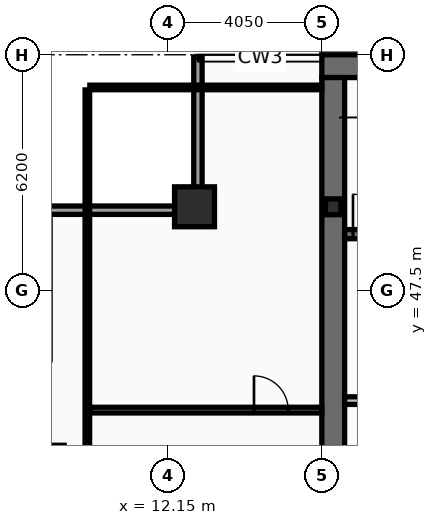
"""IFC4 building model, lengths in metres.
Left out: names, types, materials, properties, quantities, classifications, styles, units other than length and angle.
Written with IfcOpenShell. Run it as: python <this file> out.ifc"""

import sys

from ifc_helpers import new_model, si_unit, direction, frame, frame_2d, origin, origin_2d, place, context, subcontext, project, spatial, rectangle, hollow_rectangle, i_section, extrude, element, fill, save


model = new_model("IFC4")
c1 = context("Model", 3, precision=1e-05, world=origin(), true_north=direction((0.0, 1.0)))
c2 = subcontext(c1, "Body", "Model", "MODEL_VIEW")
j1 = project(units=[si_unit("LENGTHUNIT", "METRE"), si_unit("PLANEANGLEUNIT", "RADIAN")], contexts=[c1])
p1 = place(None, origin())
s1 = spatial("IfcSite", under=j1, at=p1, CompositionType="ELEMENT")
p2 = place(p1, origin())
s2 = spatial("IfcBuilding", under=s1, at=p2, CompositionType="ELEMENT")
p3 = place(p2, frame((0.0, 0.0, 239.0)))
s3 = spatial("IfcBuildingStorey", under=s2, at=p3, CompositionType="ELEMENT", Elevation=239.0)
p4 = place(p3, frame((16.2, 53.4, 0.0), z_axis=(0.0, 0.0, 1.0), x_axis=(1.0, 0.0, 0.0)))
e1 = element("IfcWall", 1, at=p4, inside=s3, PredefinedType="SHEAR", context=c2, shape_type="SweptSolid", body=[
    extrude(rectangle(XDim=40.5, YDim=0.6, at=frame_2d((20.25, 0.0))), origin(), (0.0, 0.0, 1.0), 3.44),
])
p5 = place(p3, frame((16.5, 41.9, 0.0), z_axis=(0.0, 0.0, 1.0), x_axis=(0.0, 1.0, 0.0)))
e2 = element("IfcWall", 2, at=p5, inside=s3, PredefinedType="SHEAR", context=c2, shape_type="SweptSolid", body=[
    extrude(rectangle(XDim=11.2, YDim=0.6, at=frame_2d((5.6, 0.0))), origin(), (0.0, 0.0, 1.0), 3.44),
])
p6 = place(p3, frame((16.8, 48.98, 0.0), z_axis=(0.0, 0.0, 1.0), x_axis=(1.0, 0.0, 0.0)))
e3 = element("IfcWall", 3, at=p6, inside=s3, PredefinedType="SHEAR", context=c2, shape_type="SweptSolid", body=[
    extrude(rectangle(XDim=7.42, YDim=0.24, at=frame_2d((3.71, 0.0))), origin(), (0.0, 0.0, 1.0), 3.44),
])
p7 = place(p6, frame((0.22, 0.0, 0.0)))
e4 = element("IfcOpeningElement", 4, at=p7, cuts=e3, PredefinedType="OPENING", context=c2, shape_type="SweptSolid", body=[
    extrude(rectangle(XDim=1.05, YDim=2.15, at=frame_2d((0.525, 1.075))), frame((0.0, 0.13, 0.0), z_axis=(0.0, -1.0, 0.0), x_axis=(1.0, 0.0, 0.0)), (0.0, 0.0, 1.0), 0.26),
])
p8 = place(p3, frame((12.85, 49.7, 0.0), z_axis=(0.0, 0.0, 1.0), x_axis=(1.0, 0.0, 0.0)))
e5 = element("IfcColumn", 5, at=p8, inside=s3, PredefinedType="COLUMN", context=c2, shape_type="SweptSolid", body=[
    extrude(hollow_rectangle(XDim=1.05, YDim=1.05, WallThickness=0.055, at=origin_2d()), origin(), (0.0, 0.0, 1.0), 3.6),
])
p9 = place(p3, frame((16.5, 49.7, 0.0), z_axis=(0.0, 0.0, 1.0), x_axis=(1.0, 0.0, 0.0)))
e6 = element("IfcColumn", 6, at=p9, inside=s3, PredefinedType="COLUMN", context=c2, shape_type="SweptSolid", body=[
    extrude(i_section(OverallWidth=0.406, OverallDepth=0.416, WebThickness=0.03, FlangeThickness=0.048, at=origin_2d()), origin(), (0.0, 0.0, 1.0), 3.6),
])
p10 = place(p3, frame((8.83, 49.61, 0.0), z_axis=(0.0, 0.0, 1.0), x_axis=(1.0, 0.0, 0.0)))
e7 = element("IfcWall", 7, at=p10, inside=s3, PredefinedType="SOLIDWALL", context=c2, shape_type="SweptSolid", body=[
    extrude(rectangle(XDim=4.22, YDim=0.22, at=frame_2d((2.11, 0.0))), origin(), (0.0, 0.0, 1.0), 2.83),
])
p11 = place(p3, frame((12.94, 49.72, 0.0), z_axis=(0.0, 0.0, 1.0), x_axis=(0.0, 1.0, 0.0)))
e8 = element("IfcWall", 8, at=p11, inside=s3, PredefinedType="SOLIDWALL", context=c2, shape_type="SweptSolid", body=[
    extrude(rectangle(XDim=3.91, YDim=0.22, at=frame_2d((1.955, 0.0))), origin(), (0.0, 0.0, 1.0), 2.83),
])
p12 = place(p3, frame((16.8, 44.6, 0.0), z_axis=(0.0, 0.0, 1.0), x_axis=(1.0, 0.0, 0.0)))
e9 = element("IfcWall", 9, at=p12, inside=s3, PredefinedType="PARTITIONING", context=c2, shape_type="SweptSolid", body=[
    extrude(rectangle(XDim=4.2, YDim=0.2, at=frame_2d((2.1, 0.0))), origin(), (0.0, 0.0, 1.0), 3.44),
])
p13 = place(p12, frame((1.25, 0.0, 0.0)))
e10 = element("IfcOpeningElement", 10, at=p13, cuts=e9, PredefinedType="OPENING", context=c2, shape_type="SweptSolid", body=[
    extrude(rectangle(XDim=1.05, YDim=2.15, at=frame_2d((0.525, 1.075))), frame((0.0, 0.11, 0.0), z_axis=(0.0, -1.0, 0.0), x_axis=(1.0, 0.0, 0.0)), (0.0, 0.0, 1.0), 0.22),
])
p14 = place(p3, frame((10.095, 44.35, 0.0), z_axis=(0.0, 0.0, 1.0), x_axis=(1.0, 0.0, 0.0)))
e11 = element("IfcWall", 11, at=p14, inside=s3, PredefinedType="PARTITIONING", context=c2, shape_type="SweptSolid", body=[
    extrude(rectangle(XDim=6.105, YDim=0.15, at=frame_2d((3.052, 0.0))), origin(), (0.0, 0.0, 1.0), 2.83),
])
p15 = place(p14, frame((4.32, 0.0, 0.0)))
e12 = element("IfcOpeningElement", 12, at=p15, cuts=e11, PredefinedType="OPENING", context=c2, shape_type="SweptSolid", body=[
    extrude(rectangle(XDim=0.9, YDim=2.05, at=frame_2d((0.45, 1.025))), frame((0.0, 0.085, 0.0), z_axis=(0.0, -1.0, 0.0), x_axis=(1.0, 0.0, 0.0)), (0.0, 0.0, 1.0), 0.17),
])
p16 = place(p3, frame((10.03, 10.665, 0.0), z_axis=(0.0, 0.0, 1.0), x_axis=(0.0, 1.0, 0.0)))
e13 = element("IfcWall", 13, at=p16, inside=s3, PredefinedType="PARTITIONING", context=c2, shape_type="SweptSolid", body=[
    extrude(rectangle(XDim=42.11, YDim=0.12, at=frame_2d((21.055, 0.0))), origin(), (0.0, 0.0, 1.0), 2.78),
])
p17 = place(p3, frame((10.095, 52.84, 0.0), z_axis=(0.0, 0.0, 1.0), x_axis=(1.0, 0.0, 0.0)))
e14 = element("IfcWall", 14, at=p17, inside=s3, PredefinedType="PARTITIONING", context=c2, shape_type="SweptSolid", body=[
    extrude(rectangle(XDim=6.105, YDim=0.12, at=frame_2d((3.052, 0.0))), origin(), (0.0, 0.0, 1.0), 3.44),
])
p18 = place(p7, origin())
e15 = element("IfcDoor", 15, at=p18, inside=s3, OperationType="SINGLE_SWING_LEFT", PredefinedType="DOOR", context=c2, shape_type="SweptSolid", body=[
    extrude(rectangle(XDim=1.05, YDim=2.15, at=frame_2d((0.525, 1.075))), frame((0.0, 0.025, 0.0), z_axis=(0.0, -1.0, 0.0), x_axis=(1.0, 0.0, 0.0)), (0.0, 0.0, 1.0), 0.05),
])
fill(e4, e15)
p19 = place(p15, origin())
e16 = element("IfcDoor", 16, at=p19, inside=s3, OperationType="SINGLE_SWING_LEFT", PredefinedType="DOOR", context=c2, shape_type="SweptSolid", body=[
    extrude(rectangle(XDim=0.9, YDim=2.05, at=frame_2d((0.45, 1.025))), frame((0.0, 0.025, 0.0), z_axis=(0.0, -1.0, 0.0), x_axis=(1.0, 0.0, 0.0)), (0.0, 0.0, 1.0), 0.05),
])
fill(e12, e16)
save(model, sys.argv[1])
